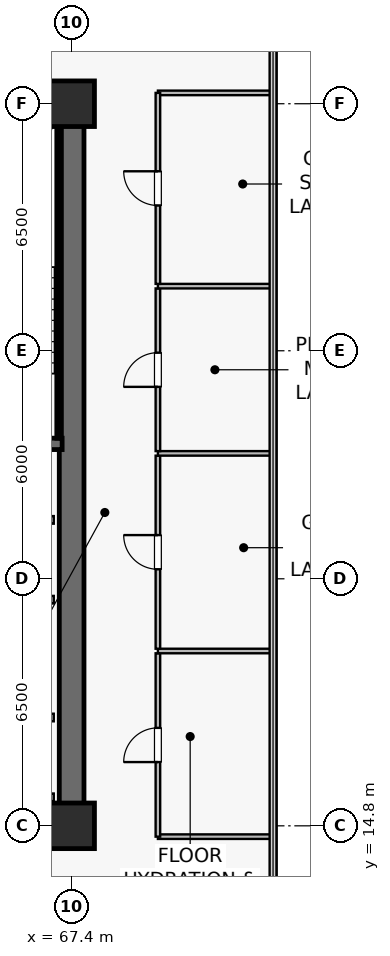
"""IFC4 building model, lengths in metres.
Left out: names, types, materials, properties, quantities, classifications, styles, units other than length and angle.
Written with IfcOpenShell. Run it as: python <this file> out.ifc"""

import sys

from ifc_helpers import new_model, si_unit, direction, frame, frame_2d, origin, origin_2d, place, context, subcontext, project, spatial, rectangle, extrude, source, transform, mapped, element, fill, save


model = new_model("IFC4")
c1 = context("Model", 3, precision=1e-05, world=origin(), true_north=direction((0.0, 1.0)))
c2 = subcontext(c1, "Body", "Model", "MODEL_VIEW")
j1 = project(units=[si_unit("LENGTHUNIT", "METRE"), si_unit("PLANEANGLEUNIT", "RADIAN")], contexts=[c1])
p1 = place(None, origin())
s1 = spatial("IfcSite", under=j1, at=p1, CompositionType="ELEMENT")
p2 = place(p1, origin())
s2 = spatial("IfcBuilding", under=s1, at=p2, CompositionType="ELEMENT")
p3 = place(p2, frame((0.0, 0.0, 105.1)))
s3 = spatial("IfcBuildingStorey", under=s2, at=p3, CompositionType="ELEMENT", Elevation=105.1)
p4 = place(p3, frame((52.275, 14.8, 0.0), z_axis=(0.0, 0.0, 1.0), x_axis=(1.0, 0.0, 0.0)))
e1 = element("IfcWall", 1, at=p4, inside=s3, PredefinedType="SHEAR", context=c2, shape_type="SweptSolid", body=[
    extrude(rectangle(XDim=15.45, YDim=0.65, at=frame_2d((7.725, 0.0))), origin(), (0.0, 0.0, 1.0), 3.79),
])
p5 = place(p3, frame((52.275, 33.8, 0.0), z_axis=(0.0, 0.0, 1.0), x_axis=(1.0, 0.0, 0.0)))
e2 = element("IfcWall", 2, at=p5, inside=s3, PredefinedType="SHEAR", context=c2, shape_type="SweptSolid", body=[
    extrude(rectangle(XDim=15.45, YDim=0.65, at=frame_2d((7.725, 0.0))), origin(), (0.0, 0.0, 1.0), 3.79),
])
p6 = place(p5, frame((9.25, 0.0, 0.0)))
e3 = element("IfcOpeningElement", 3, at=p6, cuts=e2, PredefinedType="OPENING", context=c2, shape_type="SweptSolid", body=[
    extrude(rectangle(XDim=0.95, YDim=2.15, at=frame_2d((0.475, 1.075))), frame((0.0, 0.335, 0.0), z_axis=(0.0, -1.0, 0.0), x_axis=(1.0, 0.0, 0.0)), (0.0, 0.0, 1.0), 0.67),
])
p7 = place(p5, frame((6.735, 0.0, 0.0)))
e4 = element("IfcOpeningElement", 4, at=p7, cuts=e2, PredefinedType="OPENING", context=c2, shape_type="SweptSolid", body=[
    extrude(rectangle(XDim=0.95, YDim=2.15, at=frame_2d((0.475, 1.075))), frame((0.0, 0.335, 0.0), z_axis=(0.0, -1.0, 0.0), x_axis=(1.0, 0.0, 0.0)), (0.0, 0.0, 1.0), 0.67),
])
p8 = place(p5, frame((4.185, 0.0, 0.0)))
e5 = element("IfcOpeningElement", 5, at=p8, cuts=e2, PredefinedType="OPENING", context=c2, shape_type="SweptSolid", body=[
    extrude(rectangle(XDim=0.95, YDim=2.15, at=frame_2d((0.475, 1.075))), frame((0.0, 0.335, 0.0), z_axis=(0.0, -1.0, 0.0), x_axis=(1.0, 0.0, 0.0)), (0.0, 0.0, 1.0), 0.67),
])
p9 = place(p5, frame((1.635, 0.0, 0.0)))
e6 = element("IfcOpeningElement", 6, at=p9, cuts=e2, PredefinedType="OPENING", context=c2, shape_type="SweptSolid", body=[
    extrude(rectangle(XDim=0.95, YDim=2.15, at=frame_2d((0.475, 1.075))), frame((0.0, 0.335, 0.0), z_axis=(0.0, -1.0, 0.0), x_axis=(1.0, 0.0, 0.0)), (0.0, 0.0, 1.0), 0.67),
])
p10 = place(p3, frame((67.4, 15.125, 0.0), z_axis=(0.0, 0.0, 1.0), x_axis=(0.0, 1.0, 0.0)))
e7 = element("IfcWall", 7, at=p10, inside=s3, PredefinedType="SHEAR", context=c2, shape_type="SweptSolid", body=[
    extrude(rectangle(XDim=18.35, YDim=0.65, at=frame_2d((9.175, 0.0))), origin(), (0.0, 0.0, 1.0), 3.79),
])
p11 = place(p3, frame((63.35, 24.85, 0.0), z_axis=(0.0, 0.0, 1.0), x_axis=(1.0, 0.0, 0.0)))
e8 = element("IfcWall", 8, at=p11, inside=s3, PredefinedType="SHEAR", context=c2, shape_type="SweptSolid", body=[
    extrude(rectangle(XDim=3.8, YDim=0.3, at=frame_2d((1.9, 0.0))), origin(), (0.0, 0.0, 1.0), 3.79),
])
p12 = place(p3, frame((63.35, 33.4, 0.0), z_axis=(0.0, 0.0, 1.0), x_axis=(1.0, 0.0, 0.0)))
e9 = element("IfcWall", 9, at=p12, inside=s3, PredefinedType="SOLIDWALL", context=c2, shape_type="SweptSolid", body=[
    extrude(rectangle(XDim=3.72, YDim=0.12, at=frame_2d((1.86, 0.0))), origin(), (0.0, 0.0, 1.0), 3.79),
])
p13 = place(p3, frame((67.07, 25.0, 0.0), z_axis=(0.0, 0.0, 1.0), x_axis=(0.0, 1.0, 0.0)))
e10 = element("IfcWall", 10, at=p13, inside=s3, PredefinedType="SOLIDWALL", context=c2, shape_type="SweptSolid", body=[
    extrude(rectangle(XDim=8.32, YDim=0.12, at=frame_2d((4.16, 0.0))), origin(), (0.0, 0.0, 1.0), 3.79),
])
m1 = source(origin(), c2, "Body", "SweptSolid", [
    extrude(rectangle(XDim=1.2, YDim=1.2, at=origin_2d()), origin(), (0.0, 0.0, 1.0), 4.1),
])
for number, where, z_axis, x_axis in (
    (11, (67.4, 14.8, 0.0), (0.0, 0.0, 1.0), (1.0, 0.0, 0.0)),
    (12, (67.4, 33.8, 0.0), (0.0, 0.0, 1.0), (1.0, 0.0, 0.0)),
):
    element("IfcColumn", number, at=place(p3, frame(where, z_axis=z_axis, x_axis=x_axis)), inside=s3, PredefinedType="COLUMN", context=c2, shape_type="MappedRepresentation", body=[
        mapped(m1, transform((0.0, 0.0, 0.0), scale=1.0)),
    ])
for number, where, z_axis, x_axis in (
    (13, (64.67, 17.65, 0.0), (0.0, 0.0, 1.0), (1.0, 0.0, 0.0)),
    (14, (64.67, 15.55, 0.0), (0.0, 0.0, 1.0), (1.0, 0.0, 0.0)),
    (15, (64.67, 20.75, 0.0), (0.0, 0.0, 1.0), (1.0, 0.0, 0.0)),
    (16, (64.67, 22.85, 0.0), (0.0, 0.0, 1.0), (1.0, 0.0, 0.0)),
):
    element("IfcWall", number, at=place(p3, frame(where, z_axis=z_axis, x_axis=x_axis)), inside=s3, PredefinedType="SOLIDWALL", context=c2, shape_type="SweptSolid", body=[
        extrude(rectangle(XDim=2.26, YDim=0.2, at=frame_2d((1.13, 0.0))), origin(), (0.0, 0.0, 1.0), 3.79),
    ])
for number, where, z_axis, x_axis in (
    (17, (69.67, 14.515, 0.0), (0.0, 0.0, 1.0), (1.0, 0.0, 0.0)),
    (18, (69.67, 34.085, 0.0), (0.0, 0.0, 1.0), (1.0, 0.0, 0.0)),
):
    element("IfcWall", number, at=place(p3, frame(where, z_axis=z_axis, x_axis=x_axis)), inside=s3, PredefinedType="PARTITIONING", context=c2, shape_type="SweptSolid", body=[
        extrude(rectangle(XDim=3.02, YDim=0.12, at=frame_2d((1.51, 0.0))), origin(), (0.0, 0.0, 1.0), 3.79),
    ])
p14 = place(p3, frame((69.67, 14.515, 0.0), z_axis=(0.0, 0.0, 1.0), x_axis=(0.0, 1.0, 0.0)))
e19 = element("IfcWall", 19, at=p14, inside=s3, PredefinedType="PARTITIONING", context=c2, shape_type="SweptSolid", body=[
    extrude(rectangle(XDim=4.825, YDim=0.12, at=frame_2d((2.413, 0.0))), origin(), (0.0, 0.0, 1.0), 3.79),
])
p15 = place(p14, frame((1.962, 0.0, 0.0)))
e20 = element("IfcOpeningElement", 20, at=p15, cuts=e19, PredefinedType="OPENING", context=c2, shape_type="SweptSolid", body=[
    extrude(rectangle(XDim=0.9, YDim=2.1, at=frame_2d((0.45, 1.05))), frame((0.0, 0.07, 0.0), z_axis=(0.0, -1.0, 0.0), x_axis=(1.0, 0.0, 0.0)), (0.0, 0.0, 1.0), 0.14),
])
p16 = place(p3, frame((69.67, 19.4, 0.0), z_axis=(0.0, 0.0, 1.0), x_axis=(1.0, 0.0, 0.0)))
e21 = element("IfcWall", 21, at=p16, inside=s3, PredefinedType="PARTITIONING", context=c2, shape_type="SweptSolid", body=[
    extrude(rectangle(XDim=3.02, YDim=0.12, at=frame_2d((1.51, 0.0))), origin(), (0.0, 0.0, 1.0), 3.79),
])
p17 = place(p3, frame((69.67, 19.46, 0.0), z_axis=(0.0, 0.0, 1.0), x_axis=(0.0, 1.0, 0.0)))
e22 = element("IfcWall", 22, at=p17, inside=s3, PredefinedType="PARTITIONING", context=c2, shape_type="SweptSolid", body=[
    extrude(rectangle(XDim=5.08, YDim=0.12, at=frame_2d((2.54, 0.0))), origin(), (0.0, 0.0, 1.0), 3.79),
])
p18 = place(p17, frame((2.09, 0.0, 0.0)))
e23 = element("IfcOpeningElement", 23, at=p18, cuts=e22, PredefinedType="OPENING", context=c2, shape_type="SweptSolid", body=[
    extrude(rectangle(XDim=0.9, YDim=2.1, at=frame_2d((0.45, 1.05))), frame((0.0, 0.07, 0.0), z_axis=(0.0, -1.0, 0.0), x_axis=(1.0, 0.0, 0.0)), (0.0, 0.0, 1.0), 0.14),
])
p19 = place(p3, frame((69.67, 24.6, 0.0), z_axis=(0.0, 0.0, 1.0), x_axis=(1.0, 0.0, 0.0)))
e24 = element("IfcWall", 24, at=p19, inside=s3, PredefinedType="PARTITIONING", context=c2, shape_type="SweptSolid", body=[
    extrude(rectangle(XDim=3.02, YDim=0.12, at=frame_2d((1.51, 0.0))), origin(), (0.0, 0.0, 1.0), 3.79),
])
p20 = place(p3, frame((69.67, 24.66, 0.0), z_axis=(0.0, 0.0, 1.0), x_axis=(0.0, 1.0, 0.0)))
e25 = element("IfcWall", 25, at=p20, inside=s3, PredefinedType="PARTITIONING", context=c2, shape_type="SweptSolid", body=[
    extrude(rectangle(XDim=4.28, YDim=0.12, at=frame_2d((2.14, 0.0))), origin(), (0.0, 0.0, 1.0), 3.79),
])
p21 = place(p20, frame((1.69, 0.0, 0.0)))
e26 = element("IfcOpeningElement", 26, at=p21, cuts=e25, PredefinedType="OPENING", context=c2, shape_type="SweptSolid", body=[
    extrude(rectangle(XDim=0.9, YDim=2.1, at=frame_2d((0.45, 1.05))), frame((0.0, 0.07, 0.0), z_axis=(0.0, -1.0, 0.0), x_axis=(1.0, 0.0, 0.0)), (0.0, 0.0, 1.0), 0.14),
])
p22 = place(p3, frame((69.67, 29.0, 0.0), z_axis=(0.0, 0.0, 1.0), x_axis=(1.0, 0.0, 0.0)))
e27 = element("IfcWall", 27, at=p22, inside=s3, PredefinedType="PARTITIONING", context=c2, shape_type="SweptSolid", body=[
    extrude(rectangle(XDim=3.02, YDim=0.12, at=frame_2d((1.51, 0.0))), origin(), (0.0, 0.0, 1.0), 3.79),
])
p23 = place(p3, frame((69.67, 29.06, 0.0), z_axis=(0.0, 0.0, 1.0), x_axis=(0.0, 1.0, 0.0)))
e28 = element("IfcWall", 28, at=p23, inside=s3, PredefinedType="PARTITIONING", context=c2, shape_type="SweptSolid", body=[
    extrude(rectangle(XDim=5.025, YDim=0.12, at=frame_2d((2.512, 0.0))), origin(), (0.0, 0.0, 1.0), 3.79),
])
p24 = place(p23, frame((2.062, 0.0, 0.0)))
e29 = element("IfcOpeningElement", 29, at=p24, cuts=e28, PredefinedType="OPENING", context=c2, shape_type="SweptSolid", body=[
    extrude(rectangle(XDim=0.9, YDim=2.1, at=frame_2d((0.45, 1.05))), frame((0.0, 0.07, 0.0), z_axis=(0.0, -1.0, 0.0), x_axis=(1.0, 0.0, 0.0)), (0.0, 0.0, 1.0), 0.14),
])
m2 = source(origin(), c2, "Body", "SweptSolid", [
    extrude(rectangle(XDim=0.9, YDim=2.1, at=frame_2d((0.45, 1.05))), frame((0.0, 0.025, 0.0), z_axis=(0.0, -1.0, 0.0), x_axis=(1.0, 0.0, 0.0)), (0.0, 0.0, 1.0), 0.05),
])
p25 = place(p15, origin())
e30 = element("IfcDoor", 30, at=p25, inside=s3, OperationType="SINGLE_SWING_LEFT", PredefinedType="DOOR", context=c2, shape_type="MappedRepresentation", body=[
    mapped(m2, transform((0.0, 0.0, 0.0), scale=1.0)),
])
fill(e20, e30)
p26 = place(p18, origin())
e31 = element("IfcDoor", 31, at=p26, inside=s3, OperationType="SINGLE_SWING_RIGHT", PredefinedType="DOOR", context=c2, shape_type="MappedRepresentation", body=[
    mapped(m2, transform((0.0, 0.0, 0.0), scale=1.0)),
])
fill(e23, e31)
p27 = place(p21, origin())
e32 = element("IfcDoor", 32, at=p27, inside=s3, OperationType="SINGLE_SWING_LEFT", PredefinedType="DOOR", context=c2, shape_type="MappedRepresentation", body=[
    mapped(m2, transform((0.0, 0.0, 0.0), scale=1.0)),
])
fill(e26, e32)
p28 = place(p24, origin())
e33 = element("IfcDoor", 33, at=p28, inside=s3, OperationType="SINGLE_SWING_RIGHT", PredefinedType="DOOR", context=c2, shape_type="MappedRepresentation", body=[
    mapped(m2, transform((0.0, 0.0, 0.0), scale=1.0)),
])
fill(e29, e33)
save(model, sys.argv[1])
